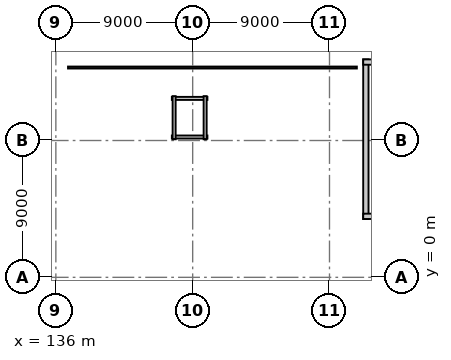
"""IFC4 building model, lengths in metres.
Left out: names, types, materials, properties, quantities, classifications, styles, units other than length and angle.
Written with IfcOpenShell. Run it as: python <this file> out.ifc"""

import sys

from ifc_helpers import new_model, si_unit, direction, frame, frame_2d, origin, origin_2d, place, context, subcontext, project, spatial, rectangle, i_section, extrude, element, fill, save


model = new_model("IFC4")
c1 = context("Model", 3, precision=1e-05, world=origin(), true_north=direction((0.0, 1.0)))
c2 = subcontext(c1, "Body", "Model", "MODEL_VIEW")
j1 = project(units=[si_unit("LENGTHUNIT", "METRE"), si_unit("PLANEANGLEUNIT", "RADIAN")], contexts=[c1])
p1 = place(None, origin())
s1 = spatial("IfcSite", under=j1, at=p1, CompositionType="ELEMENT")
p2 = place(p1, origin())
s2 = spatial("IfcBuilding", under=s1, at=p2, CompositionType="ELEMENT")
p3 = place(p2, frame((0.0, 0.0, 14.4)))
s3 = spatial("IfcBuildingStorey", under=s2, at=p3, CompositionType="ELEMENT", Elevation=14.4)
for number, where, z_axis, x_axis in (
    (1, (136.0, 0.0, 0.0), (0.0, 0.0, 1.0), (1.0, 0.0, 0.0)),
    (2, (136.0, 9.0, 0.0), (0.0, 0.0, 1.0), (1.0, 0.0, 0.0)),
    (3, (145.0, 0.0, 0.0), (0.0, 0.0, 1.0), (1.0, 0.0, 0.0)),
    (4, (145.0, 9.0, 0.0), (0.0, 0.0, 1.0), (1.0, 0.0, 0.0)),
    (5, (154.0, 0.0, 0.0), (0.0, 0.0, 1.0), (1.0, 0.0, 0.0)),
    (6, (154.0, 9.0, 0.0), (0.0, 0.0, 1.0), (1.0, 0.0, 0.0)),
):
    element("IfcColumn", number, at=place(p3, frame(where, z_axis=z_axis, x_axis=x_axis)), inside=s3, PredefinedType="COLUMN", context=c2, shape_type="SweptSolid", body=[
        extrude(i_section(OverallWidth=0.35, OverallDepth=0.35, WebThickness=0.012, FlangeThickness=0.019, FilletRadius=0.02, at=origin_2d()), origin(), (0.0, 0.0, 1.0), 3.2),
    ])
p4 = place(p3, frame((156.393, 14.335, 0.0), z_axis=(0.0, 0.0, 1.0), x_axis=(0.0, -1.0, 0.0)))
e7 = element("IfcWall", 7, at=p4, inside=s3, PredefinedType="SHEAR", context=c2, shape_type="SweptSolid", body=[
    extrude(rectangle(XDim=10.498, YDim=0.35, at=frame_2d((5.249, 0.0))), origin(), (0.0, 0.0, 1.0), 2.995),
])
p5 = place(p4, frame((8.397, 0.0, 0.0)))
e8 = element("IfcOpeningElement", 8, at=p5, cuts=e7, PredefinedType="OPENING", context=c2, shape_type="SweptSolid", body=[
    extrude(rectangle(XDim=1.3, YDim=2.1, at=frame_2d((0.65, 1.05))), frame((0.0, 0.185, 0.0), z_axis=(0.0, -1.0, 0.0), x_axis=(1.0, 0.0, 0.0)), (0.0, 0.0, 1.0), 0.37),
])
for number, where, z_axis, x_axis in (
    (9, (160.538, 14.16, 0.0), (0.0, 0.0, 1.0), (-1.0, 0.0, 0.0)),
    (10, (156.218, 4.012, 0.0), (0.0, 0.0, 1.0), (1.0, 0.0, 0.0)),
):
    element("IfcWall", number, at=place(p3, frame(where, z_axis=z_axis, x_axis=x_axis)), inside=s3, PredefinedType="SHEAR", context=c2, shape_type="SweptSolid", body=[
        extrude(rectangle(XDim=4.32, YDim=0.35, at=frame_2d((2.16, 0.0))), origin(), (0.0, 0.0, 1.0), 2.995),
    ])
p6 = place(p3, frame((143.63, 9.23, 0.0), z_axis=(0.0, 0.0, 1.0), x_axis=(1.0, 0.0, 0.0)))
e11 = element("IfcWall", 11, at=p6, inside=s3, PredefinedType="SOLIDWALL", context=c2, shape_type="SweptSolid", body=[
    extrude(rectangle(XDim=2.34, YDim=0.2, at=frame_2d((1.17, 0.0))), origin(), (0.0, 0.0, 1.0), 2.53),
])
p7 = place(p3, frame((145.97, 11.77, 0.0), z_axis=(0.0, 0.0, 1.0), x_axis=(-1.0, 0.0, 0.0)))
e12 = element("IfcWall", 12, at=p7, inside=s3, PredefinedType="SOLIDWALL", context=c2, shape_type="SweptSolid", body=[
    extrude(rectangle(XDim=2.34, YDim=0.2, at=frame_2d((1.17, 0.0))), origin(), (0.0, 0.0, 1.0), 2.58),
])
p8 = place(p3, frame((143.78, 11.92, 0.0), z_axis=(0.0, 0.0, 1.0), x_axis=(0.0, -1.0, 0.0)))
e13 = element("IfcWall", 13, at=p8, inside=s3, PredefinedType="SOLIDWALL", context=c2, shape_type="SweptSolid", body=[
    extrude(rectangle(XDim=2.84, YDim=0.2, at=frame_2d((1.42, 0.0))), origin(), (0.0, 0.0, 1.0), 2.53),
])
p9 = place(p3, frame((145.82, 9.08, 0.0), z_axis=(0.0, 0.0, 1.0), x_axis=(0.0, 1.0, 0.0)))
e14 = element("IfcWall", 14, at=p9, inside=s3, PredefinedType="SOLIDWALL", context=c2, shape_type="SweptSolid", body=[
    extrude(rectangle(XDim=2.84, YDim=0.2, at=frame_2d((1.42, 0.0))), origin(), (0.0, 0.0, 1.0), 2.53),
])
p10 = place(p9, frame((0.87, 0.0, 0.0)))
e15 = element("IfcOpeningElement", 15, at=p10, cuts=e14, PredefinedType="OPENING", context=c2, shape_type="SweptSolid", body=[
    extrude(rectangle(XDim=1.1, YDim=2.15, at=frame_2d((0.55, 1.075))), frame((0.0, 0.11, 0.0), z_axis=(0.0, -1.0, 0.0), x_axis=(1.0, 0.0, 0.0)), (0.0, 0.0, 1.0), 0.22),
])
p11 = place(p3, frame((136.8, 13.8, 0.0), z_axis=(0.0, 0.0, 1.0), x_axis=(1.0, 0.0, 0.0)))
e16 = element("IfcWall", 16, at=p11, inside=s3, PredefinedType="PARTITIONING", context=c2, shape_type="SweptSolid", body=[
    extrude(rectangle(XDim=19.0, YDim=0.13, at=frame_2d((9.5, 0.0))), origin(), (0.0, 0.0, 1.0), 2.58),
])
p12 = place(p11, frame((8.725, 0.0, 0.0)))
e17 = element("IfcOpeningElement", 17, at=p12, cuts=e16, PredefinedType="OPENING", context=c2, shape_type="SweptSolid", body=[
    extrude(rectangle(XDim=1.55, YDim=2.1, at=frame_2d((0.775, 1.05))), frame((0.0, 0.075, 0.0), z_axis=(0.0, -1.0, 0.0), x_axis=(1.0, 0.0, 0.0)), (0.0, 0.0, 1.0), 0.15),
])
p13 = place(p11, frame((14.44, 0.0, 0.0)))
e18 = element("IfcOpeningElement", 18, at=p13, cuts=e16, PredefinedType="OPENING", context=c2, shape_type="SweptSolid", body=[
    extrude(rectangle(XDim=1.55, YDim=2.1, at=frame_2d((0.775, 1.05))), frame((0.0, 0.075, 0.0), z_axis=(0.0, -1.0, 0.0), x_axis=(1.0, 0.0, 0.0)), (0.0, 0.0, 1.0), 0.15),
])
p14 = place(p5, origin())
e19 = element("IfcDoor", 19, at=p14, inside=s3, OperationType="SINGLE_SWING_LEFT", PredefinedType="DOOR", context=c2, shape_type="SweptSolid", body=[
    extrude(rectangle(XDim=1.3, YDim=2.1, at=frame_2d((0.65, 1.05))), frame((0.0, 0.025, 0.0), z_axis=(0.0, -1.0, 0.0), x_axis=(1.0, 0.0, 0.0)), (0.0, 0.0, 1.0), 0.05),
])
fill(e8, e19)
p15 = place(p10, origin())
e20 = element("IfcDoor", 20, at=p15, inside=s3, OperationType="SLIDING_TO_LEFT", PredefinedType="DOOR", context=c2, shape_type="SweptSolid", body=[
    extrude(rectangle(XDim=1.1, YDim=2.15, at=frame_2d((0.55, 1.075))), frame((0.0, 0.025, 0.0), z_axis=(0.0, -1.0, 0.0), x_axis=(1.0, 0.0, 0.0)), (0.0, 0.0, 1.0), 0.05),
])
fill(e15, e20)
p16 = place(p12, origin())
e21 = element("IfcDoor", 21, at=p16, inside=s3, OperationType="SINGLE_SWING_LEFT", PredefinedType="DOOR", context=c2, shape_type="SweptSolid", body=[
    extrude(rectangle(XDim=1.55, YDim=2.1, at=frame_2d((0.775, 1.05))), frame((0.0, 0.025, 0.0), z_axis=(0.0, -1.0, 0.0), x_axis=(1.0, 0.0, 0.0)), (0.0, 0.0, 1.0), 0.05),
])
fill(e17, e21)
p17 = place(p13, origin())
e22 = element("IfcDoor", 22, at=p17, inside=s3, OperationType="SINGLE_SWING_RIGHT", PredefinedType="DOOR", context=c2, shape_type="SweptSolid", body=[
    extrude(rectangle(XDim=1.55, YDim=2.1, at=frame_2d((0.775, 1.05))), frame((0.0, 0.025, 0.0), z_axis=(0.0, -1.0, 0.0), x_axis=(1.0, 0.0, 0.0)), (0.0, 0.0, 1.0), 0.05),
])
fill(e18, e22)
save(model, sys.argv[1])
